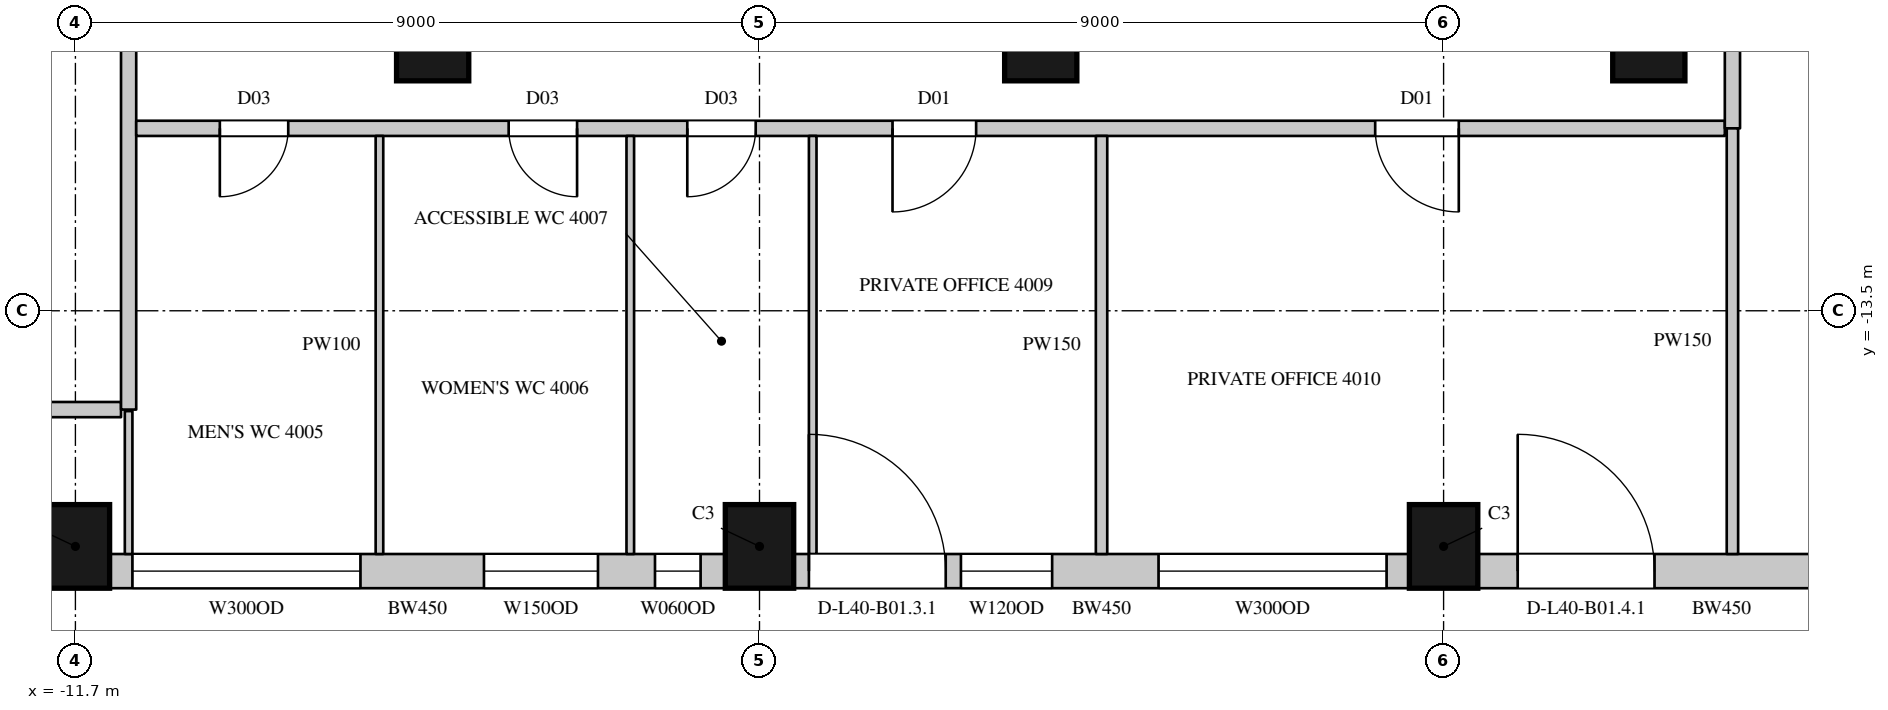
"""IFC4 building model, lengths in metres.
Left out: names, types, materials, properties, quantities, classifications, styles, units other than length and angle.
Written with IfcOpenShell. Run it as: python <this file> out.ifc"""

import sys

from ifc_helpers import new_model, si_unit, direction, frame, frame_2d, origin, origin_2d, place, context, subcontext, project, spatial, rectangle, circle, extrude, element, fill, save


model = new_model("IFC4")
c1 = context("Model", 3, precision=1e-05, world=origin(), true_north=direction((0.0, 1.0)))
c2 = subcontext(c1, "Body", "Model", "MODEL_VIEW")
j1 = project(units=[si_unit("LENGTHUNIT", "METRE"), si_unit("PLANEANGLEUNIT", "RADIAN")], contexts=[c1])
p1 = place(None, origin())
s1 = spatial("IfcSite", under=j1, at=p1, CompositionType="ELEMENT")
p2 = place(p1, origin())
s2 = spatial("IfcBuilding", under=s1, at=p2, CompositionType="ELEMENT")
p3 = place(p2, frame((0.0, 0.0, 185.1)))
s3 = spatial("IfcBuildingStorey", under=s2, at=p3, CompositionType="ELEMENT", Elevation=185.1)
for number, where, z_axis, x_axis in (
    (1, (-11.7, -16.6, 0.0), (0.0, 0.0, 1.0), (1.0, 0.0, 0.0)),
    (2, (-2.7, -16.6, 0.0), (0.0, 0.0, 1.0), (1.0, 0.0, 0.0)),
    (3, (6.3, -16.6, 0.0), (0.0, 0.0, 1.0), (1.0, 0.0, 0.0)),
):
    element("IfcColumn", number, at=place(p3, frame(where, z_axis=z_axis, x_axis=x_axis)), inside=s3, PredefinedType="COLUMN", context=c2, shape_type="SweptSolid", body=[
        extrude(rectangle(XDim=0.9, YDim=1.1, at=origin_2d()), origin(), (0.0, 0.0, 1.0), 4.1),
    ])
for number, where, z_axis, x_axis in (
    (4, (-7.0, -10.0, 0.0), (0.0, 0.0, 1.0), (1.0, 0.0, 0.0)),
    (5, (1.0, -10.0, 0.0), (0.0, 0.0, 1.0), (1.0, 0.0, 0.0)),
    (6, (9.0, -10.0, 0.0), (0.0, 0.0, 1.0), (1.0, 0.0, 0.0)),
):
    element("IfcColumn", number, at=place(p3, frame(where, z_axis=z_axis, x_axis=x_axis)), inside=s3, PredefinedType="COLUMN", context=c2, shape_type="SweptSolid", body=[
        extrude(circle(Radius=0.475, at=origin_2d()), origin(), (0.0, 0.0, 1.0), 4.1),
    ])
p4 = place(p3, frame((-11.25, -16.925, 0.0), z_axis=(0.0, 0.0, 1.0), x_axis=(1.0, 0.0, 0.0)))
e7 = element("IfcWall", 7, at=p4, inside=s3, PredefinedType="SOLIDWALL", context=c2, shape_type="SweptSolid", body=[
    extrude(rectangle(XDim=8.1, YDim=0.45, at=frame_2d((4.05, 0.0))), origin(), (0.0, 0.0, 1.0), 3.8),
])
p5 = place(p4, frame((0.3, 0.0, 1.05)))
e8 = element("IfcOpeningElement", 8, at=p5, cuts=e7, PredefinedType="OPENING", context=c2, shape_type="SweptSolid", body=[
    extrude(rectangle(XDim=3.0, YDim=2.4, at=frame_2d((1.5, 1.2))), frame((0.0, 0.235, 0.0), z_axis=(0.0, -1.0, 0.0), x_axis=(1.0, 0.0, 0.0)), (0.0, 0.0, 1.0), 0.47),
])
p6 = place(p4, frame((4.925, 0.0, 1.05)))
e9 = element("IfcOpeningElement", 9, at=p6, cuts=e7, PredefinedType="OPENING", context=c2, shape_type="SweptSolid", body=[
    extrude(rectangle(XDim=1.5, YDim=2.4, at=frame_2d((0.75, 1.2))), frame((0.0, 0.235, 0.0), z_axis=(0.0, -1.0, 0.0), x_axis=(1.0, 0.0, 0.0)), (0.0, 0.0, 1.0), 0.47),
])
p7 = place(p4, frame((7.175, 0.0, 1.05)))
e10 = element("IfcOpeningElement", 10, at=p7, cuts=e7, PredefinedType="OPENING", context=c2, shape_type="SweptSolid", body=[
    extrude(rectangle(XDim=0.6, YDim=2.4, at=frame_2d((0.3, 1.2))), frame((0.0, 0.235, 0.0), z_axis=(0.0, -1.0, 0.0), x_axis=(1.0, 0.0, 0.0)), (0.0, 0.0, 1.0), 0.47),
])
p8 = place(p3, frame((-2.25, -16.925, 0.0), z_axis=(0.0, 0.0, 1.0), x_axis=(1.0, 0.0, 0.0)))
e11 = element("IfcWall", 11, at=p8, inside=s3, PredefinedType="SOLIDWALL", context=c2, shape_type="SweptSolid", body=[
    extrude(rectangle(XDim=8.1, YDim=0.45, at=frame_2d((4.05, 0.0))), origin(), (0.0, 0.0, 1.0), 3.8),
])
p9 = place(p8, frame((0.2, 0.0, 0.0)))
e12 = element("IfcOpeningElement", 12, at=p9, cuts=e11, PredefinedType="OPENING", context=c2, shape_type="SweptSolid", body=[
    extrude(rectangle(XDim=1.8, YDim=2.4, at=frame_2d((0.9, 1.2))), frame((0.0, 0.235, 0.0), z_axis=(0.0, -1.0, 0.0), x_axis=(1.0, 0.0, 0.0)), (0.0, 0.0, 1.0), 0.47),
])
p10 = place(p8, frame((2.2, 0.0, 1.05)))
e13 = element("IfcOpeningElement", 13, at=p10, cuts=e11, PredefinedType="OPENING", context=c2, shape_type="SweptSolid", body=[
    extrude(rectangle(XDim=1.2, YDim=2.4, at=frame_2d((0.6, 1.2))), frame((0.0, 0.235, 0.0), z_axis=(0.0, -1.0, 0.0), x_axis=(1.0, 0.0, 0.0)), (0.0, 0.0, 1.0), 0.47),
])
p11 = place(p8, frame((4.8, 0.0, 1.05)))
e14 = element("IfcOpeningElement", 14, at=p11, cuts=e11, PredefinedType="OPENING", context=c2, shape_type="SweptSolid", body=[
    extrude(rectangle(XDim=3.0, YDim=2.4, at=frame_2d((1.5, 1.2))), frame((0.0, 0.235, 0.0), z_axis=(0.0, -1.0, 0.0), x_axis=(1.0, 0.0, 0.0)), (0.0, 0.0, 1.0), 0.47),
])
p12 = place(p3, frame((6.75, -16.925, 0.0), z_axis=(0.0, 0.0, 1.0), x_axis=(1.0, 0.0, 0.0)))
e15 = element("IfcWall", 15, at=p12, inside=s3, PredefinedType="SOLIDWALL", context=c2, shape_type="SweptSolid", body=[
    extrude(rectangle(XDim=6.414, YDim=0.45, at=frame_2d((3.207, 0.0))), origin(), (0.0, 0.0, 1.0), 3.8),
])
p13 = place(p12, frame((0.525, 0.0, 0.0)))
e16 = element("IfcOpeningElement", 16, at=p13, cuts=e15, PredefinedType="OPENING", context=c2, shape_type="SweptSolid", body=[
    extrude(rectangle(XDim=1.8, YDim=2.4, at=frame_2d((0.9, 1.2))), frame((0.0, 0.235, 0.0), z_axis=(0.0, -1.0, 0.0), x_axis=(1.0, 0.0, 0.0)), (0.0, 0.0, 1.0), 0.47),
])
p14 = place(p3, frame((-13.97, -14.8, 0.0), z_axis=(0.0, 0.0, 1.0), x_axis=(1.0, 0.0, 0.0)))
e17 = element("IfcWall", 17, at=p14, inside=s3, PredefinedType="PARTITIONING", context=c2, shape_type="SweptSolid", body=[
    extrude(rectangle(XDim=2.87, YDim=0.2, at=frame_2d((1.435, 0.0))), origin(), (0.0, 0.0, 1.0), 3.8),
])
p15 = place(p3, frame((-11.0, -14.8, 0.0), z_axis=(0.0, 0.0, 1.0), x_axis=(0.0, 1.0, 0.0)))
e18 = element("IfcWall", 18, at=p15, inside=s3, PredefinedType="PARTITIONING", context=c2, shape_type="SweptSolid", body=[
    extrude(rectangle(XDim=29.6, YDim=0.2, at=frame_2d((14.8, 0.0))), origin(), (0.0, 0.0, 1.0), 3.8),
])
p16 = place(p15, frame((20.15, 0.0, 0.0)))
e19 = element("IfcOpeningElement", 19, at=p16, cuts=e18, PredefinedType="OPENING", context=c2, shape_type="SweptSolid", body=[
    extrude(rectangle(XDim=1.5, YDim=2.4, at=frame_2d((0.75, 1.2))), frame((0.0, 0.11, 0.0), z_axis=(0.0, -1.0, 0.0), x_axis=(1.0, 0.0, 0.0)), (0.0, 0.0, 1.0), 0.22),
])
p17 = place(p3, frame((-10.9, -11.1, 0.0), z_axis=(0.0, 0.0, 1.0), x_axis=(1.0, 0.0, 0.0)))
e20 = element("IfcWall", 20, at=p17, inside=s3, PredefinedType="PARTITIONING", context=c2, shape_type="SweptSolid", body=[
    extrude(rectangle(XDim=20.9, YDim=0.2, at=frame_2d((10.45, 0.0))), origin(), (0.0, 0.0, 1.0), 3.8),
])
p18 = place(p17, frame((1.1, 0.0, 0.0)))
e21 = element("IfcOpeningElement", 21, at=p18, cuts=e20, PredefinedType="OPENING", context=c2, shape_type="SweptSolid", body=[
    extrude(rectangle(XDim=0.9, YDim=2.2, at=frame_2d((0.45, 1.1))), frame((0.0, 0.11, 0.0), z_axis=(0.0, -1.0, 0.0), x_axis=(1.0, 0.0, 0.0)), (0.0, 0.0, 1.0), 0.22),
])
p19 = place(p17, frame((4.9, 0.0, 0.0)))
e22 = element("IfcOpeningElement", 22, at=p19, cuts=e20, PredefinedType="OPENING", context=c2, shape_type="SweptSolid", body=[
    extrude(rectangle(XDim=0.9, YDim=2.2, at=frame_2d((0.45, 1.1))), frame((0.0, 0.11, 0.0), z_axis=(0.0, -1.0, 0.0), x_axis=(1.0, 0.0, 0.0)), (0.0, 0.0, 1.0), 0.22),
])
p20 = place(p17, frame((7.25, 0.0, 0.0)))
e23 = element("IfcOpeningElement", 23, at=p20, cuts=e20, PredefinedType="OPENING", context=c2, shape_type="SweptSolid", body=[
    extrude(rectangle(XDim=0.9, YDim=2.2, at=frame_2d((0.45, 1.1))), frame((0.0, 0.11, 0.0), z_axis=(0.0, -1.0, 0.0), x_axis=(1.0, 0.0, 0.0)), (0.0, 0.0, 1.0), 0.22),
])
p21 = place(p17, frame((9.95, 0.0, 0.0)))
e24 = element("IfcOpeningElement", 24, at=p21, cuts=e20, PredefinedType="OPENING", context=c2, shape_type="SweptSolid", body=[
    extrude(rectangle(XDim=1.1, YDim=2.4, at=frame_2d((0.55, 1.2))), frame((0.0, 0.11, 0.0), z_axis=(0.0, -1.0, 0.0), x_axis=(1.0, 0.0, 0.0)), (0.0, 0.0, 1.0), 0.22),
])
p22 = place(p17, frame((16.3, 0.0, 0.0)))
e25 = element("IfcOpeningElement", 25, at=p22, cuts=e20, PredefinedType="OPENING", context=c2, shape_type="SweptSolid", body=[
    extrude(rectangle(XDim=1.1, YDim=2.4, at=frame_2d((0.55, 1.2))), frame((0.0, 0.11, 0.0), z_axis=(0.0, -1.0, 0.0), x_axis=(1.0, 0.0, 0.0)), (0.0, 0.0, 1.0), 0.22),
])
p23 = place(p3, frame((10.1, -11.1, 0.0), z_axis=(0.0, 0.0, 1.0), x_axis=(0.0, 1.0, 0.0)))
e26 = element("IfcWall", 26, at=p23, inside=s3, PredefinedType="PARTITIONING", context=c2, shape_type="SweptSolid", body=[
    extrude(rectangle(XDim=23.2, YDim=0.2, at=frame_2d((11.6, 0.0))), origin(), (0.0, 0.0, 1.0), 3.8),
])
p24 = place(p23, frame((8.0, 0.0, 0.0)))
e27 = element("IfcOpeningElement", 27, at=p24, cuts=e26, PredefinedType="OPENING", context=c2, shape_type="SweptSolid", body=[
    extrude(rectangle(XDim=1.5, YDim=2.4, at=frame_2d((0.75, 1.2))), frame((0.0, 0.11, 0.0), z_axis=(0.0, -1.0, 0.0), x_axis=(1.0, 0.0, 0.0)), (0.0, 0.0, 1.0), 0.22),
])
p25 = place(p23, frame((18.95, 0.0, 0.0)))
e28 = element("IfcOpeningElement", 28, at=p25, cuts=e26, PredefinedType="OPENING", context=c2, shape_type="SweptSolid", body=[
    extrude(rectangle(XDim=1.1, YDim=2.4, at=frame_2d((0.55, 1.2))), frame((0.0, 0.11, 0.0), z_axis=(0.0, -1.0, 0.0), x_axis=(1.0, 0.0, 0.0)), (0.0, 0.0, 1.0), 0.22),
])
p26 = place(p23, frame((2.7, 0.0, 0.0)))
e29 = element("IfcOpeningElement", 29, at=p26, cuts=e26, PredefinedType="OPENING", context=c2, shape_type="SweptSolid", body=[
    extrude(rectangle(XDim=1.1, YDim=2.4, at=frame_2d((0.55, 1.2))), frame((0.0, 0.11, 0.0), z_axis=(0.0, -1.0, 0.0), x_axis=(1.0, 0.0, 0.0)), (0.0, 0.0, 1.0), 0.22),
])
p27 = place(p3, frame((1.8, -16.7, 0.0), z_axis=(0.0, 0.0, 1.0), x_axis=(0.0, 1.0, 0.0)))
e30 = element("IfcWall", 30, at=p27, inside=s3, PredefinedType="PARTITIONING", context=c2, shape_type="SweptSolid", body=[
    extrude(rectangle(XDim=5.5, YDim=0.15, at=frame_2d((2.75, 0.0))), origin(), (0.0, 0.0, 1.0), 3.15),
])
p28 = place(p3, frame((10.1, -16.7, 0.0), z_axis=(0.0, 0.0, 1.0), x_axis=(0.0, 1.0, 0.0)))
e31 = element("IfcWall", 31, at=p28, inside=s3, PredefinedType="PARTITIONING", context=c2, shape_type="SweptSolid", body=[
    extrude(rectangle(XDim=5.6, YDim=0.15, at=frame_2d((2.8, 0.0))), origin(), (0.0, 0.0, 1.0), 3.8),
])
p29 = place(p3, frame((-11.0, -16.7, 0.0), z_axis=(0.0, 0.0, 1.0), x_axis=(0.0, 1.0, 0.0)))
e32 = element("IfcWall", 32, at=p29, inside=s3, PredefinedType="PARTITIONING", context=c2, shape_type="SweptSolid", body=[
    extrude(rectangle(XDim=1.88, YDim=0.1, at=frame_2d((0.94, 0.0))), origin(), (0.0, 0.0, 1.0), 3.8),
])
for number, where, z_axis, x_axis in (
    (33, (-7.7, -16.7, 0.0), (0.0, 0.0, 1.0), (0.0, 1.0, 0.0)),
    (34, (-4.4, -16.7, 0.0), (0.0, 0.0, 1.0), (0.0, 1.0, 0.0)),
    (35, (-2.0, -16.7, 0.0), (0.0, 0.0, 1.0), (0.0, 1.0, 0.0)),
):
    element("IfcWall", number, at=place(p3, frame(where, z_axis=z_axis, x_axis=x_axis)), inside=s3, PredefinedType="PARTITIONING", context=c2, shape_type="SweptSolid", body=[
        extrude(rectangle(XDim=5.5, YDim=0.1, at=frame_2d((2.75, 0.0))), origin(), (0.0, 0.0, 1.0), 3.8),
    ])
p30 = place(p5, origin())
e36 = element("IfcWindow", 36, at=p30, inside=s3, PartitioningType="SINGLE_PANEL", PredefinedType="WINDOW", context=c2, shape_type="SweptSolid", body=[
    extrude(rectangle(XDim=3.0, YDim=2.4, at=frame_2d((1.5, 1.2))), frame((0.0, 0.135, 0.0), z_axis=(0.0, -1.0, 0.0), x_axis=(1.0, 0.0, 0.0)), (0.0, 0.0, 1.0), 0.06),
])
fill(e8, e36)
p31 = place(p9, origin())
e37 = element("IfcDoor", 37, at=p31, inside=s3, OperationType="SLIDING_TO_LEFT", PredefinedType="DOOR", context=c2, shape_type="SweptSolid", body=[
    extrude(rectangle(XDim=1.8, YDim=2.4, at=frame_2d((0.9, 1.2))), frame((0.0, 0.13, 0.0), z_axis=(0.0, -1.0, 0.0), x_axis=(1.0, 0.0, 0.0)), (0.0, 0.0, 1.0), 0.05),
])
fill(e12, e37)
p32 = place(p10, origin())
e38 = element("IfcWindow", 38, at=p32, inside=s3, PartitioningType="SINGLE_PANEL", PredefinedType="WINDOW", context=c2, shape_type="SweptSolid", body=[
    extrude(rectangle(XDim=1.2, YDim=2.4, at=frame_2d((0.6, 1.2))), frame((0.0, 0.135, 0.0), z_axis=(0.0, -1.0, 0.0), x_axis=(1.0, 0.0, 0.0)), (0.0, 0.0, 1.0), 0.06),
])
fill(e13, e38)
p33 = place(p11, origin())
e39 = element("IfcWindow", 39, at=p33, inside=s3, PartitioningType="SINGLE_PANEL", PredefinedType="WINDOW", context=c2, shape_type="SweptSolid", body=[
    extrude(rectangle(XDim=3.0, YDim=2.4, at=frame_2d((1.5, 1.2))), frame((0.0, 0.135, 0.0), z_axis=(0.0, -1.0, 0.0), x_axis=(1.0, 0.0, 0.0)), (0.0, 0.0, 1.0), 0.06),
])
fill(e14, e39)
p34 = place(p13, origin())
e40 = element("IfcDoor", 40, at=p34, inside=s3, OperationType="SLIDING_TO_LEFT", PredefinedType="DOOR", context=c2, shape_type="SweptSolid", body=[
    extrude(rectangle(XDim=1.8, YDim=2.4, at=frame_2d((0.9, 1.2))), frame((0.0, 0.13, 0.0), z_axis=(0.0, -1.0, 0.0), x_axis=(1.0, 0.0, 0.0)), (0.0, 0.0, 1.0), 0.05),
])
fill(e16, e40)
p35 = place(p18, origin())
e41 = element("IfcDoor", 41, at=p35, inside=s3, OperationType="SINGLE_SWING_RIGHT", PredefinedType="DOOR", context=c2, shape_type="SweptSolid", body=[
    extrude(rectangle(XDim=0.9, YDim=2.2, at=frame_2d((0.45, 1.1))), frame((0.0, 0.025, 0.0), z_axis=(0.0, -1.0, 0.0), x_axis=(1.0, 0.0, 0.0)), (0.0, 0.0, 1.0), 0.05),
])
fill(e21, e41)
p36 = place(p19, origin())
e42 = element("IfcDoor", 42, at=p36, inside=s3, OperationType="SINGLE_SWING_LEFT", PredefinedType="DOOR", context=c2, shape_type="SweptSolid", body=[
    extrude(rectangle(XDim=0.9, YDim=2.2, at=frame_2d((0.45, 1.1))), frame((0.0, 0.025, 0.0), z_axis=(0.0, -1.0, 0.0), x_axis=(1.0, 0.0, 0.0)), (0.0, 0.0, 1.0), 0.05),
])
fill(e22, e42)
p37 = place(p20, origin())
e43 = element("IfcDoor", 43, at=p37, inside=s3, OperationType="SINGLE_SWING_RIGHT", PredefinedType="DOOR", context=c2, shape_type="SweptSolid", body=[
    extrude(rectangle(XDim=0.9, YDim=2.2, at=frame_2d((0.45, 1.1))), frame((0.0, 0.025, 0.0), z_axis=(0.0, -1.0, 0.0), x_axis=(1.0, 0.0, 0.0)), (0.0, 0.0, 1.0), 0.05),
])
fill(e23, e43)
p38 = place(p21, origin())
e44 = element("IfcDoor", 44, at=p38, inside=s3, OperationType="SINGLE_SWING_RIGHT", PredefinedType="DOOR", context=c2, shape_type="SweptSolid", body=[
    extrude(rectangle(XDim=1.1, YDim=2.4, at=frame_2d((0.55, 1.2))), frame((0.0, 0.025, 0.0), z_axis=(0.0, -1.0, 0.0), x_axis=(1.0, 0.0, 0.0)), (0.0, 0.0, 1.0), 0.05),
])
fill(e24, e44)
p39 = place(p22, origin())
e45 = element("IfcDoor", 45, at=p39, inside=s3, OperationType="SINGLE_SWING_LEFT", PredefinedType="DOOR", context=c2, shape_type="SweptSolid", body=[
    extrude(rectangle(XDim=1.1, YDim=2.4, at=frame_2d((0.55, 1.2))), frame((0.0, 0.025, 0.0), z_axis=(0.0, -1.0, 0.0), x_axis=(1.0, 0.0, 0.0)), (0.0, 0.0, 1.0), 0.05),
])
fill(e25, e45)
p40 = place(p6, origin())
e46 = element("IfcWindow", 46, at=p40, inside=s3, PartitioningType="SINGLE_PANEL", PredefinedType="WINDOW", context=c2, shape_type="SweptSolid", body=[
    extrude(rectangle(XDim=1.5, YDim=2.4, at=frame_2d((0.75, 1.2))), frame((0.0, 0.135, 0.0), z_axis=(0.0, -1.0, 0.0), x_axis=(1.0, 0.0, 0.0)), (0.0, 0.0, 1.0), 0.06),
])
fill(e9, e46)
p41 = place(p7, origin())
e47 = element("IfcWindow", 47, at=p41, inside=s3, PartitioningType="SINGLE_PANEL", PredefinedType="WINDOW", context=c2, shape_type="SweptSolid", body=[
    extrude(rectangle(XDim=0.6, YDim=2.4, at=frame_2d((0.3, 1.2))), frame((0.0, 0.135, 0.0), z_axis=(0.0, -1.0, 0.0), x_axis=(1.0, 0.0, 0.0)), (0.0, 0.0, 1.0), 0.06),
])
fill(e10, e47)
save(model, sys.argv[1])
